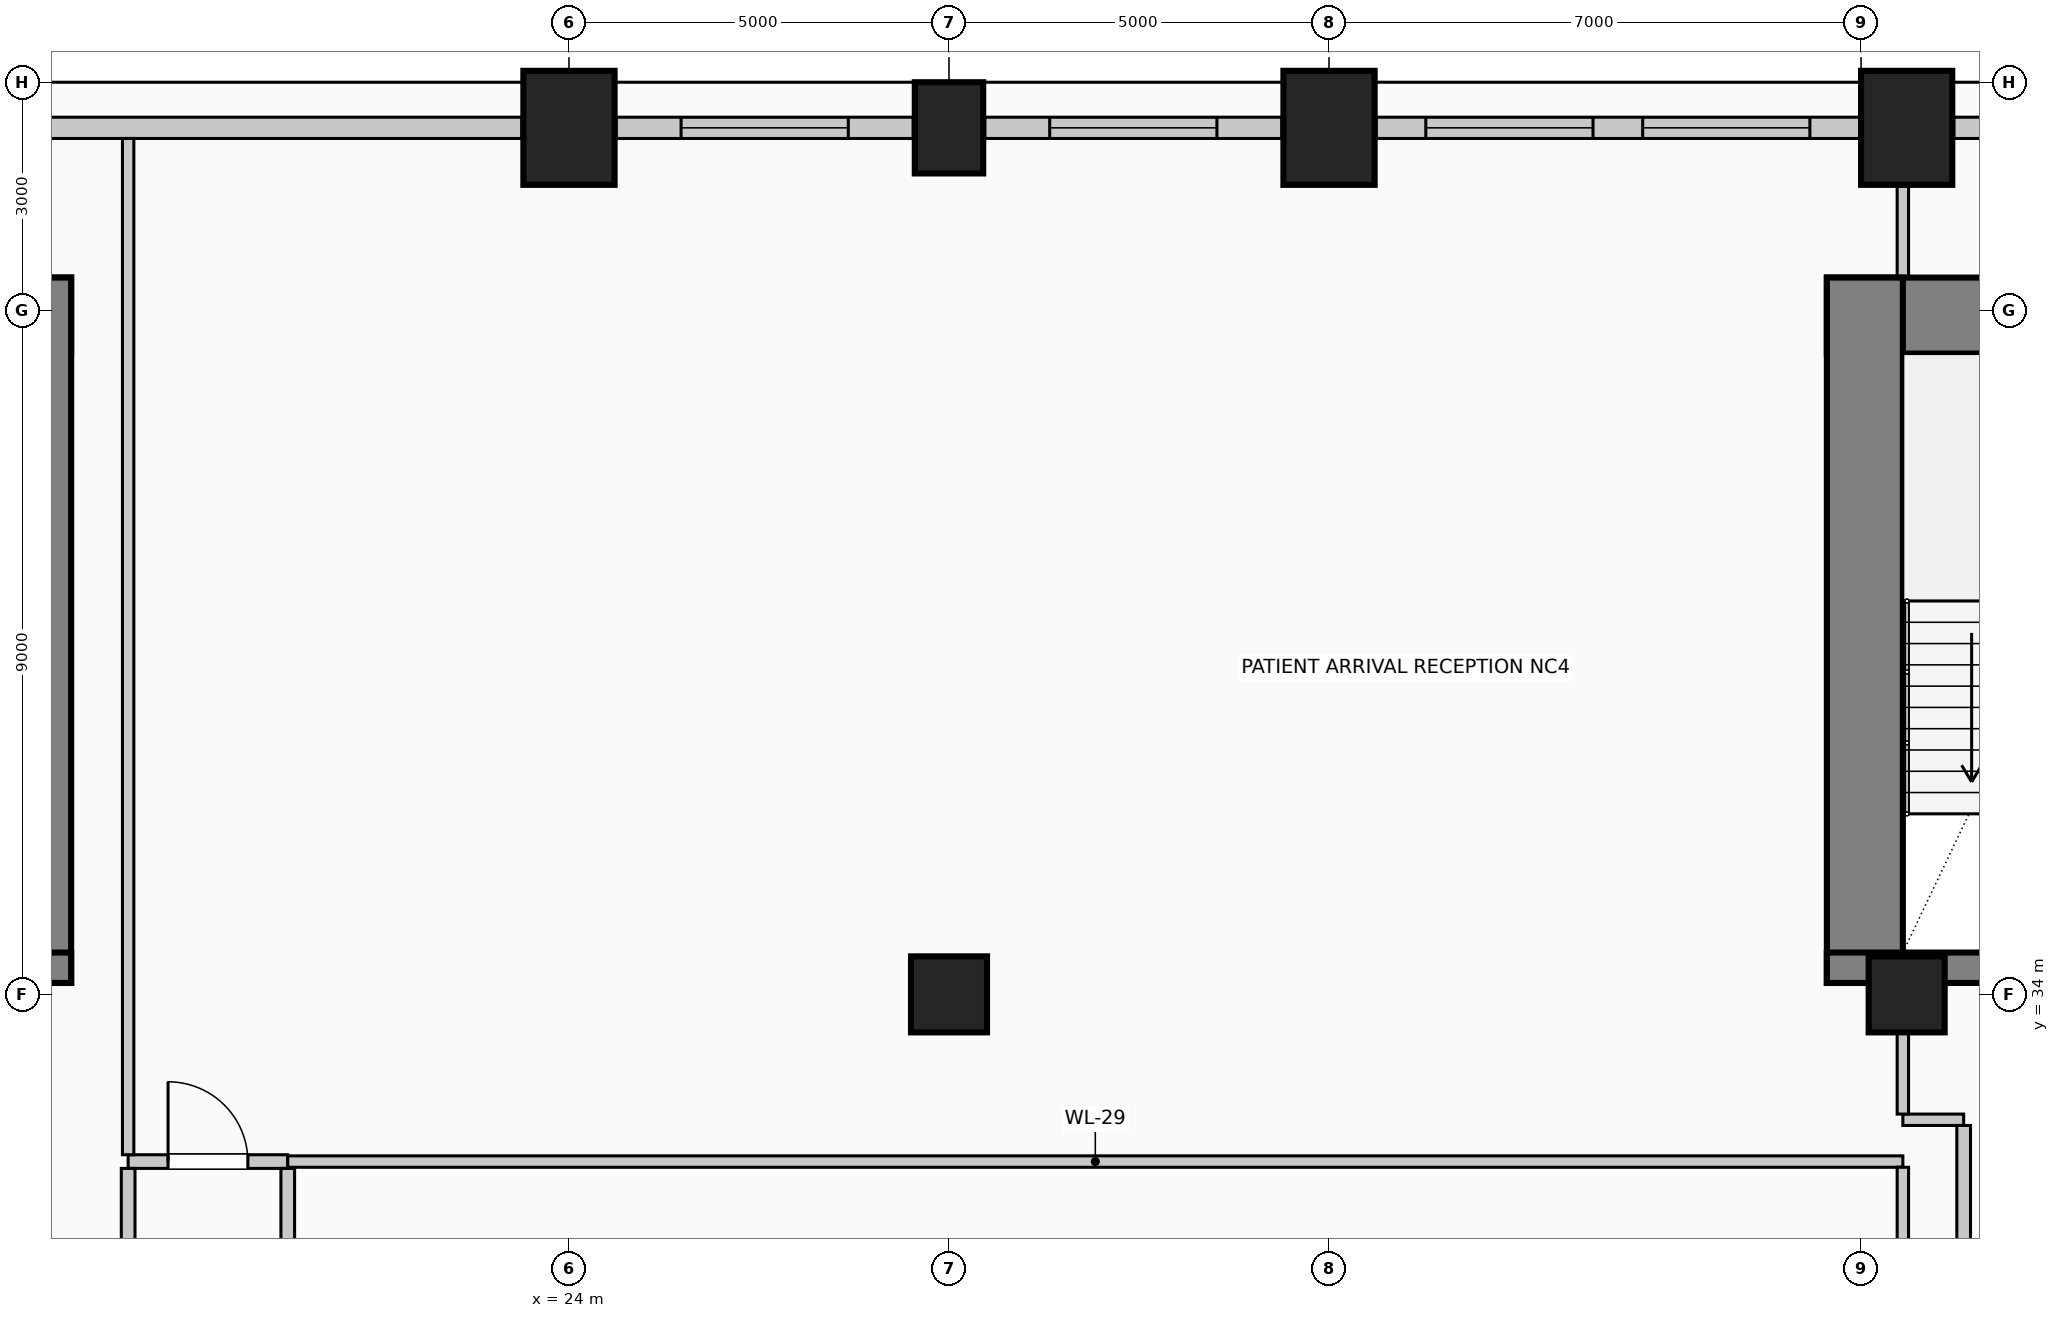
"""IFC4 building model, lengths in metres.
Left out: names, types, materials, properties, quantities, classifications, styles, units other than length and angle.
Written with IfcOpenShell. Run it as: python <this file> out.ifc"""

import sys

from ifc_helpers import new_model, si_unit, direction, frame, frame_2d, origin, origin_2d, place, context, subcontext, project, spatial, rectangle, circle, extrude, element, fill, save


model = new_model("IFC4")
c1 = context("Model", 3, precision=1e-05, world=origin(), true_north=direction((0.0, 1.0)))
c2 = subcontext(c1, "Body", "Model", "MODEL_VIEW")
j1 = project(units=[si_unit("LENGTHUNIT", "METRE"), si_unit("PLANEANGLEUNIT", "RADIAN")], contexts=[c1])
p1 = place(None, origin())
s1 = spatial("IfcSite", under=j1, at=p1, CompositionType="ELEMENT")
p2 = place(p1, origin())
s2 = spatial("IfcBuilding", under=s1, at=p2, CompositionType="ELEMENT")
p3 = place(p2, frame((0.0, 0.0, 50.6)))
s3 = spatial("IfcBuildingStorey", under=s2, at=p3, CompositionType="ELEMENT", Elevation=50.6)
p4 = place(p3, frame((2.55, 42.93, 0.0), z_axis=(0.0, 0.0, 1.0), x_axis=(1.0, 0.0, 0.0)))
e1 = element("IfcWall", 1, at=p4, inside=s3, PredefinedType="SHEAR", context=c2, shape_type="SweptSolid", body=[
    extrude(rectangle(XDim=14.9, YDim=1.0, at=frame_2d((7.45, 0.0))), origin(), (0.0, 0.0, 1.0), 4.0),
])
p5 = place(p3, frame((16.95, 34.15, 0.0), z_axis=(0.0, 0.0, 1.0), x_axis=(0.0, 1.0, 0.0)))
e2 = element("IfcWall", 2, at=p5, inside=s3, PredefinedType="SHEAR", context=c2, shape_type="SweptSolid", body=[
    extrude(rectangle(XDim=9.28, YDim=1.0, at=frame_2d((4.64, 0.0))), origin(), (0.0, 0.0, 1.0), 4.0),
])
p6 = place(p3, frame((12.29, 34.35, 0.0), z_axis=(0.0, 0.0, 1.0), x_axis=(1.0, 0.0, 0.0)))
e3 = element("IfcWall", 3, at=p6, inside=s3, PredefinedType="SHEAR", context=c2, shape_type="SweptSolid", body=[
    extrude(rectangle(XDim=5.16, YDim=0.4, at=frame_2d((2.58, 0.0))), origin(), (0.0, 0.0, 1.0), 4.0),
])
p7 = place(p6, frame((1.4, 0.0, 0.0)))
e4 = element("IfcOpeningElement", 4, at=p7, cuts=e3, PredefinedType="OPENING", context=c2, shape_type="SweptSolid", body=[
    extrude(rectangle(XDim=1.15, YDim=2.2, at=frame_2d((0.575, 1.1))), frame((0.0, 0.21, 0.0), z_axis=(0.0, -1.0, 0.0), x_axis=(1.0, 0.0, 0.0)), (0.0, 0.0, 1.0), 0.42),
])
p8 = place(p3, frame((40.55, 42.93, 0.0), z_axis=(0.0, 0.0, 1.0), x_axis=(1.0, 0.0, 0.0)))
e5 = element("IfcWall", 5, at=p8, inside=s3, PredefinedType="SHEAR", context=c2, shape_type="SweptSolid", body=[
    extrude(rectangle(XDim=14.9, YDim=1.0, at=frame_2d((7.45, 0.0))), origin(), (0.0, 0.0, 1.0), 4.0),
])
p9 = place(p3, frame((41.05, 34.15, 0.0), z_axis=(0.0, 0.0, 1.0), x_axis=(0.0, 1.0, 0.0)))
e6 = element("IfcWall", 6, at=p9, inside=s3, PredefinedType="SHEAR", context=c2, shape_type="SweptSolid", body=[
    extrude(rectangle(XDim=9.28, YDim=1.0, at=frame_2d((4.64, 0.0))), origin(), (0.0, 0.0, 1.0), 4.0),
])
p10 = place(p3, frame((40.55, 34.35, 0.0), z_axis=(0.0, 0.0, 1.0), x_axis=(1.0, 0.0, 0.0)))
e7 = element("IfcWall", 7, at=p10, inside=s3, PredefinedType="SHEAR", context=c2, shape_type="SweptSolid", body=[
    extrude(rectangle(XDim=5.16, YDim=0.4, at=frame_2d((2.58, 0.0))), origin(), (0.0, 0.0, 1.0), 4.0),
])
p11 = place(p10, frame((2.4, 0.0, 0.0)))
e8 = element("IfcOpeningElement", 8, at=p11, cuts=e7, PredefinedType="OPENING", context=c2, shape_type="SweptSolid", body=[
    extrude(rectangle(XDim=1.15, YDim=2.2, at=frame_2d((0.575, 1.1))), frame((0.0, 0.21, 0.0), z_axis=(0.0, -1.0, 0.0), x_axis=(1.0, 0.0, 0.0)), (0.0, 0.0, 1.0), 0.42),
])
p12 = place(p3, frame((24.0, 45.4, 0.0), z_axis=(0.0, 0.0, 1.0), x_axis=(1.0, 0.0, 0.0)))
e9 = element("IfcColumn", 9, at=p12, inside=s3, PredefinedType="COLUMN", context=c2, shape_type="SweptSolid", body=[
    extrude(rectangle(XDim=1.2, YDim=1.5, at=origin_2d()), origin(), (0.0, 0.0, 1.0), 4.0),
])
p13 = place(p3, frame((29.0, 45.4, 0.0), z_axis=(0.0, 0.0, 1.0), x_axis=(1.0, 0.0, 0.0)))
e10 = element("IfcColumn", 10, at=p13, inside=s3, PredefinedType="COLUMN", context=c2, shape_type="SweptSolid", body=[
    extrude(rectangle(XDim=0.9, YDim=1.2, at=origin_2d()), origin(), (0.0, 0.0, 1.0), 4.0),
])
for number, where, z_axis, x_axis in (
    (11, (34.0, 45.4, 0.0), (0.0, 0.0, 1.0), (1.0, 0.0, 0.0)),
    (12, (41.6, 45.4, 0.0), (0.0, 0.0, 1.0), (1.0, 0.0, 0.0)),
):
    element("IfcColumn", number, at=place(p3, frame(where, z_axis=z_axis, x_axis=x_axis)), inside=s3, PredefinedType="COLUMN", context=c2, shape_type="SweptSolid", body=[
        extrude(rectangle(XDim=1.2, YDim=1.5, at=origin_2d()), origin(), (0.0, 0.0, 1.0), 4.0),
    ])
for number, where, z_axis, x_axis in (
    (13, (29.0, 34.0, 0.0), (0.0, 0.0, 1.0), (1.0, 0.0, 0.0)),
    (14, (41.6, 34.0, 0.0), (0.0, 0.0, 1.0), (1.0, 0.0, 0.0)),
):
    element("IfcColumn", number, at=place(p3, frame(where, z_axis=z_axis, x_axis=x_axis)), inside=s3, PredefinedType="COLUMN", context=c2, shape_type="SweptSolid", body=[
        extrude(circle(Radius=0.5, at=origin_2d()), origin(), (0.0, 0.0, 1.0), 4.0),
    ])
p14 = place(p3, frame((17.02, 45.4, 0.0), z_axis=(0.0, 0.0, 1.0), x_axis=(1.0, 0.0, 0.0)))
e15 = element("IfcWall", 15, at=p14, inside=s3, PredefinedType="SOLIDWALL", context=c2, shape_type="SweptSolid", body=[
    extrude(rectangle(XDim=6.36, YDim=0.28, at=frame_2d((3.18, 0.0))), origin(), (0.0, 0.0, 1.0), 2.85),
])
p15 = place(p3, frame((24.62, 45.4, 0.0), z_axis=(0.0, 0.0, 1.0), x_axis=(1.0, 0.0, 0.0)))
e16 = element("IfcWall", 16, at=p15, inside=s3, PredefinedType="SOLIDWALL", context=c2, shape_type="SweptSolid", body=[
    extrude(rectangle(XDim=3.91, YDim=0.28, at=frame_2d((1.955, 0.0))), origin(), (0.0, 0.0, 1.0), 2.85),
])
p16 = place(p15, frame((0.855, 0.0, 0.5)))
e17 = element("IfcOpeningElement", 17, at=p16, cuts=e16, PredefinedType="OPENING", context=c2, shape_type="SweptSolid", body=[
    extrude(rectangle(XDim=2.2, YDim=1.95, at=frame_2d((1.1, 0.975))), frame((0.0, 0.15, 0.0), z_axis=(0.0, -1.0, 0.0), x_axis=(1.0, 0.0, 0.0)), (0.0, 0.0, 1.0), 0.3),
])
p17 = place(p3, frame((29.47, 45.4, 0.0), z_axis=(0.0, 0.0, 1.0), x_axis=(1.0, 0.0, 0.0)))
e18 = element("IfcWall", 18, at=p17, inside=s3, PredefinedType="SOLIDWALL", context=c2, shape_type="SweptSolid", body=[
    extrude(rectangle(XDim=3.91, YDim=0.28, at=frame_2d((1.955, 0.0))), origin(), (0.0, 0.0, 1.0), 2.85),
])
p18 = place(p17, frame((0.855, 0.0, 0.5)))
e19 = element("IfcOpeningElement", 19, at=p18, cuts=e18, PredefinedType="OPENING", context=c2, shape_type="SweptSolid", body=[
    extrude(rectangle(XDim=2.2, YDim=1.95, at=frame_2d((1.1, 0.975))), frame((0.0, 0.15, 0.0), z_axis=(0.0, -1.0, 0.0), x_axis=(1.0, 0.0, 0.0)), (0.0, 0.0, 1.0), 0.3),
])
p19 = place(p3, frame((34.62, 45.4, 0.0), z_axis=(0.0, 0.0, 1.0), x_axis=(1.0, 0.0, 0.0)))
e20 = element("IfcWall", 20, at=p19, inside=s3, PredefinedType="SOLIDWALL", context=c2, shape_type="SweptSolid", body=[
    extrude(rectangle(XDim=6.36, YDim=0.28, at=frame_2d((3.18, 0.0))), origin(), (0.0, 0.0, 1.0), 2.85),
])
p20 = place(p19, frame((0.653, 0.0, 0.5)))
e21 = element("IfcOpeningElement", 21, at=p20, cuts=e20, PredefinedType="OPENING", context=c2, shape_type="SweptSolid", body=[
    extrude(rectangle(XDim=2.2, YDim=1.95, at=frame_2d((1.1, 0.975))), frame((0.0, 0.15, 0.0), z_axis=(0.0, -1.0, 0.0), x_axis=(1.0, 0.0, 0.0)), (0.0, 0.0, 1.0), 0.3),
])
p21 = place(p19, frame((3.507, 0.0, 0.5)))
e22 = element("IfcOpeningElement", 22, at=p21, cuts=e20, PredefinedType="OPENING", context=c2, shape_type="SweptSolid", body=[
    extrude(rectangle(XDim=2.2, YDim=1.95, at=frame_2d((1.1, 0.975))), frame((0.0, 0.15, 0.0), z_axis=(0.0, -1.0, 0.0), x_axis=(1.0, 0.0, 0.0)), (0.0, 0.0, 1.0), 0.3),
])
p22 = place(p3, frame((42.22, 45.4, 0.0), z_axis=(0.0, 0.0, 1.0), x_axis=(1.0, 0.0, 0.0)))
e23 = element("IfcWall", 23, at=p22, inside=s3, PredefinedType="SOLIDWALL", context=c2, shape_type="SweptSolid", body=[
    extrude(rectangle(XDim=1.31, YDim=0.28, at=frame_2d((0.655, 0.0))), origin(), (0.0, 0.0, 1.0), 2.85),
])
p23 = place(p3, frame((18.2, 31.8, 0.0), z_axis=(0.0, 0.0, 1.0), x_axis=(1.0, 0.0, 0.0)))
e24 = element("IfcWall", 24, at=p23, inside=s3, PredefinedType="PARTITIONING", context=c2, shape_type="SweptSolid", body=[
    extrude(rectangle(XDim=2.1, YDim=0.18, at=frame_2d((1.05, 0.0))), origin(), (0.0, 0.0, 1.0), 3.7),
])
p24 = place(p23, frame((0.525, 0.0, 0.0)))
e25 = element("IfcOpeningElement", 25, at=p24, cuts=e24, PredefinedType="OPENING", context=c2, shape_type="SweptSolid", body=[
    extrude(rectangle(XDim=1.05, YDim=2.15, at=frame_2d((0.525, 1.075))), frame((0.0, 0.1, 0.0), z_axis=(0.0, -1.0, 0.0), x_axis=(1.0, 0.0, 0.0)), (0.0, 0.0, 1.0), 0.2),
])
p25 = place(p3, frame((20.3, 31.8, 0.0), z_axis=(0.0, 0.0, 1.0), x_axis=(1.0, 0.0, 0.0)))
e26 = element("IfcWall", 26, at=p25, inside=s3, PredefinedType="PARTITIONING", context=c2, shape_type="SweptSolid", body=[
    extrude(rectangle(XDim=21.25, YDim=0.15, at=frame_2d((10.625, 0.0))), origin(), (0.0, 0.0, 1.0), 3.7),
])
p26 = place(p3, frame((41.55, 32.35, 0.0), z_axis=(0.0, 0.0, 1.0), x_axis=(1.0, 0.0, 0.0)))
e27 = element("IfcWall", 27, at=p26, inside=s3, PredefinedType="PARTITIONING", context=c2, shape_type="SweptSolid", body=[
    extrude(rectangle(XDim=0.8, YDim=0.15, at=frame_2d((0.4, 0.0))), origin(), (0.0, 0.0, 1.0), 3.7),
])
p27 = place(p3, frame((18.2, 21.19, 0.0), z_axis=(0.0, 0.0, 1.0), x_axis=(0.0, 1.0, 0.0)))
e28 = element("IfcWall", 28, at=p27, inside=s3, PredefinedType="PARTITIONING", context=c2, shape_type="SweptSolid", body=[
    extrude(rectangle(XDim=10.52, YDim=0.18, at=frame_2d((5.26, 0.0))), origin(), (0.0, 0.0, 1.0), 3.7),
])
p28 = place(p3, frame((18.2, 31.89, 0.0), z_axis=(0.0, 0.0, 1.0), x_axis=(0.0, 1.0, 0.0)))
e29 = element("IfcWall", 29, at=p28, inside=s3, PredefinedType="PARTITIONING", context=c2, shape_type="SweptSolid", body=[
    extrude(rectangle(XDim=13.37, YDim=0.15, at=frame_2d((6.685, 0.0))), origin(), (0.0, 0.0, 1.0), 3.7),
])
p29 = place(p3, frame((20.3, 21.19, 0.0), z_axis=(0.0, 0.0, 1.0), x_axis=(0.0, 1.0, 0.0)))
e30 = element("IfcWall", 30, at=p29, inside=s3, PredefinedType="PARTITIONING", context=c2, shape_type="SweptSolid", body=[
    extrude(rectangle(XDim=10.52, YDim=0.18, at=frame_2d((5.26, 0.0))), origin(), (0.0, 0.0, 1.0), 3.7),
])
p30 = place(p3, frame((41.55, 26.75, 0.0), z_axis=(0.0, 0.0, 1.0), x_axis=(0.0, 1.0, 0.0)))
e31 = element("IfcWall", 31, at=p30, inside=s3, PredefinedType="PARTITIONING", context=c2, shape_type="SweptSolid", body=[
    extrude(rectangle(XDim=4.975, YDim=0.15, at=frame_2d((2.488, 0.0))), origin(), (0.0, 0.0, 1.0), 2.995),
])
p31 = place(p3, frame((41.55, 32.425, 0.0), z_axis=(0.0, 0.0, 1.0), x_axis=(0.0, 1.0, 0.0)))
e32 = element("IfcWall", 32, at=p31, inside=s3, PredefinedType="PARTITIONING", context=c2, shape_type="SweptSolid", body=[
    extrude(rectangle(XDim=1.075, YDim=0.15, at=frame_2d((0.538, 0.0))), origin(), (0.0, 0.0, 1.0), 2.995),
])
p32 = place(p3, frame((41.55, 43.43, 0.0), z_axis=(0.0, 0.0, 1.0), x_axis=(0.0, 1.0, 0.0)))
e33 = element("IfcWall", 33, at=p32, inside=s3, PredefinedType="PARTITIONING", context=c2, shape_type="SweptSolid", body=[
    extrude(rectangle(XDim=1.22, YDim=0.15, at=frame_2d((0.61, 0.0))), origin(), (0.0, 0.0, 1.0), 3.7),
])
p33 = place(p3, frame((42.35, 21.19, 0.0), z_axis=(0.0, 0.0, 1.0), x_axis=(0.0, 1.0, 0.0)))
e34 = element("IfcWall", 34, at=p33, inside=s3, PredefinedType="PARTITIONING", context=c2, shape_type="SweptSolid", body=[
    extrude(rectangle(XDim=11.085, YDim=0.18, at=frame_2d((5.542, 0.0))), origin(), (0.0, 0.0, 1.0), 3.7),
])
p34 = place(p16, origin())
e35 = element("IfcWindow", 35, at=p34, inside=s3, PartitioningType="SINGLE_PANEL", PredefinedType="WINDOW", context=c2, shape_type="SweptSolid", body=[
    extrude(rectangle(XDim=2.2, YDim=1.95, at=frame_2d((1.1, 0.975))), frame((0.0, 0.03, 0.0), z_axis=(0.0, -1.0, 0.0), x_axis=(1.0, 0.0, 0.0)), (0.0, 0.0, 1.0), 0.06),
])
fill(e17, e35)
p35 = place(p18, origin())
e36 = element("IfcWindow", 36, at=p35, inside=s3, PartitioningType="SINGLE_PANEL", PredefinedType="WINDOW", context=c2, shape_type="SweptSolid", body=[
    extrude(rectangle(XDim=2.2, YDim=1.95, at=frame_2d((1.1, 0.975))), frame((0.0, 0.03, 0.0), z_axis=(0.0, -1.0, 0.0), x_axis=(1.0, 0.0, 0.0)), (0.0, 0.0, 1.0), 0.06),
])
fill(e19, e36)
p36 = place(p20, origin())
e37 = element("IfcWindow", 37, at=p36, inside=s3, PartitioningType="SINGLE_PANEL", PredefinedType="WINDOW", context=c2, shape_type="SweptSolid", body=[
    extrude(rectangle(XDim=2.2, YDim=1.95, at=frame_2d((1.1, 0.975))), frame((0.0, 0.03, 0.0), z_axis=(0.0, -1.0, 0.0), x_axis=(1.0, 0.0, 0.0)), (0.0, 0.0, 1.0), 0.06),
])
fill(e21, e37)
p37 = place(p21, origin())
e38 = element("IfcWindow", 38, at=p37, inside=s3, PartitioningType="SINGLE_PANEL", PredefinedType="WINDOW", context=c2, shape_type="SweptSolid", body=[
    extrude(rectangle(XDim=2.2, YDim=1.95, at=frame_2d((1.1, 0.975))), frame((0.0, 0.03, 0.0), z_axis=(0.0, -1.0, 0.0), x_axis=(1.0, 0.0, 0.0)), (0.0, 0.0, 1.0), 0.06),
])
fill(e22, e38)
p38 = place(p24, origin())
e39 = element("IfcDoor", 39, at=p38, inside=s3, OperationType="SINGLE_SWING_LEFT", PredefinedType="DOOR", context=c2, shape_type="SweptSolid", body=[
    extrude(rectangle(XDim=1.05, YDim=2.15, at=frame_2d((0.525, 1.075))), frame((0.0, 0.025, 0.0), z_axis=(0.0, -1.0, 0.0), x_axis=(1.0, 0.0, 0.0)), (0.0, 0.0, 1.0), 0.05),
])
fill(e25, e39)
save(model, sys.argv[1])
